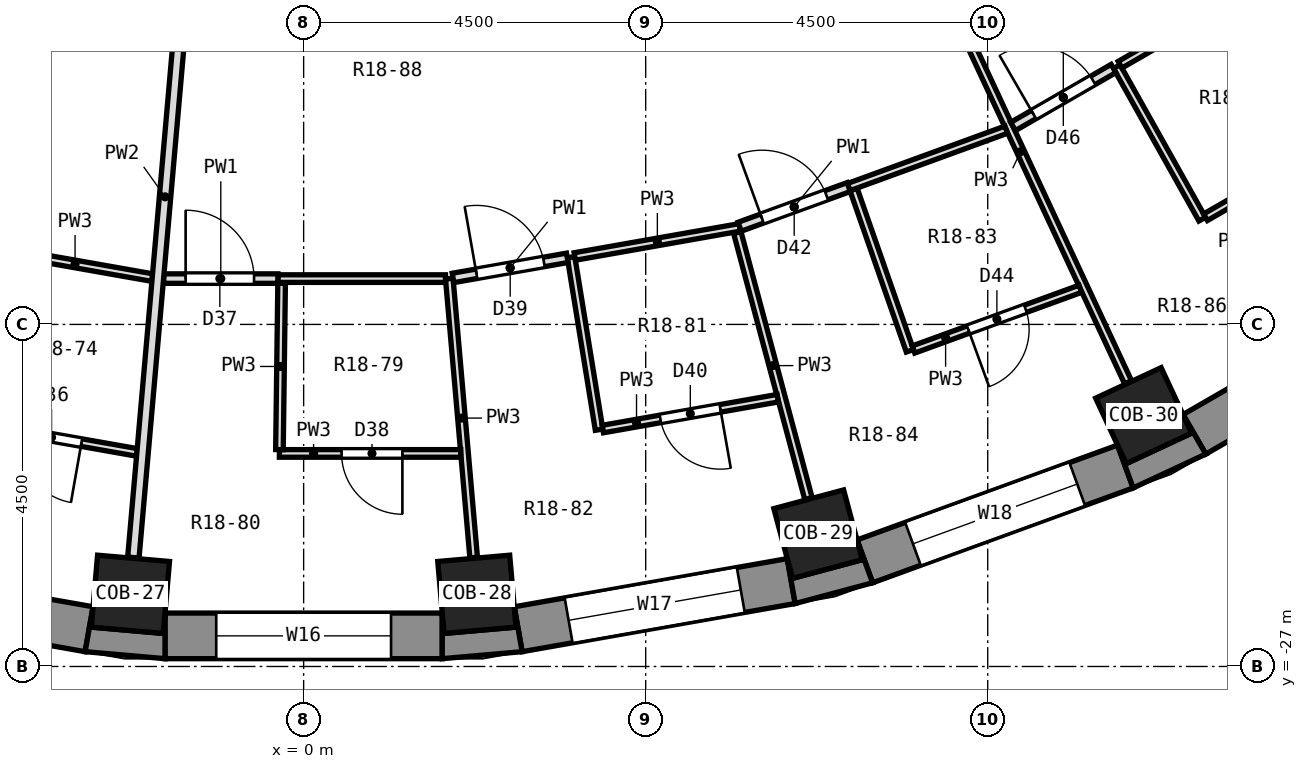
"""IFC4 building model, lengths in metres.
Left out: names, types, materials, properties, quantities, classifications, styles, units other than length and angle.
Written with IfcOpenShell. Run it as: python <this file> out.ifc"""

import sys

from ifc_helpers import new_model, si_unit, direction, frame, frame_2d, origin, origin_2d, place, context, subcontext, project, spatial, polyline, rectangle, outline, extrude, element, fill, save


model = new_model("IFC4")
c1 = context("Model", 3, precision=1e-05, world=origin(), true_north=direction((0.0, 1.0)))
c2 = subcontext(c1, "Body", "Model", "MODEL_VIEW")
j1 = project(units=[si_unit("LENGTHUNIT", "METRE"), si_unit("PLANEANGLEUNIT", "RADIAN")], contexts=[c1])
p1 = place(None, origin())
s1 = spatial("IfcSite", under=j1, at=p1, CompositionType="ELEMENT")
p2 = place(p1, origin())
s2 = spatial("IfcBuilding", under=s1, at=p2, CompositionType="ELEMENT")
p3 = place(p2, frame((0.0, 0.0, 101.8)))
s3 = spatial("IfcBuildingStorey", under=s2, at=p3, CompositionType="ELEMENT", Elevation=101.8)
for number, where, z_axis, x_axis in (
    (1, (-2.279, -26.051, 0.0), (0.0, 0.0, 1.0), (-0.087, -0.996, 0.0)),
    (2, (2.279, -26.051, 0.0), (0.0, 0.0, 1.0), (0.087, -0.996, 0.0)),
    (3, (6.768, -25.259, 0.0), (0.0, 0.0, 1.0), (0.259, -0.966, 0.0)),
    (4, (11.052, -23.7, 0.0), (0.0, 0.0, 1.0), (0.423, -0.906, 0.0)),
):
    element("IfcColumn", number, at=place(p3, frame(where, z_axis=z_axis, x_axis=x_axis)), inside=s3, PredefinedType="COLUMN", context=c2, shape_type="SweptSolid", body=[
        extrude(rectangle(XDim=0.95, YDim=0.95, at=origin_2d()), origin(), (0.0, 0.0, 1.0), 3.3),
    ])
p4 = place(p3, frame((-6.415, -25.876, 0.0), z_axis=(0.0, 0.0, 1.0), x_axis=(0.984803764455, -0.173670796382, 0.0)))
e5 = element("IfcWall", 5, at=p4, inside=s3, PredefinedType="SOLIDWALL", context=c2, shape_type="SweptSolid", body=[
    extrude(rectangle(XDim=3.648, YDim=0.6, at=frame_2d((1.824, 0.0))), origin(), (0.0, 0.0, 1.0), 2.8),
])
p5 = place(p4, frame((0.674, 0.0, 0.9)))
e6 = element("IfcOpeningElement", 6, at=p5, cuts=e5, PredefinedType="OPENING", context=c2, shape_type="SweptSolid", body=[
    extrude(rectangle(XDim=2.3, YDim=1.8, at=frame_2d((1.15, 0.9))), frame((0.0, 0.312, 0.0), z_axis=(0.0, -1.0, 0.0), x_axis=(1.0, 0.0, 0.0)), (0.0, 0.0, 1.0), 0.624),
])
p6 = place(p3, frame((-1.824, -26.597, 0.0), z_axis=(0.0, 0.0, 1.0), x_axis=(1.0, 0.0, 0.0)))
e7 = element("IfcWall", 7, at=p6, inside=s3, PredefinedType="SOLIDWALL", context=c2, shape_type="SweptSolid", body=[
    extrude(rectangle(XDim=3.648, YDim=0.6, at=frame_2d((1.824, 0.0))), origin(), (0.0, 0.0, 1.0), 2.8),
])
p7 = place(p6, frame((0.674, 0.0, 0.9)))
e8 = element("IfcOpeningElement", 8, at=p7, cuts=e7, PredefinedType="OPENING", context=c2, shape_type="SweptSolid", body=[
    extrude(rectangle(XDim=2.3, YDim=1.8, at=frame_2d((1.15, 0.9))), frame((0.0, 0.312, 0.0), z_axis=(0.0, -1.0, 0.0), x_axis=(1.0, 0.0, 0.0)), (0.0, 0.0, 1.0), 0.624),
])
p8 = place(p3, frame((2.822, -26.51, 0.0), z_axis=(0.0, 0.0, 1.0), x_axis=(0.984803764455, 0.173670796382, 0.0)))
e9 = element("IfcWall", 9, at=p8, inside=s3, PredefinedType="SOLIDWALL", context=c2, shape_type="SweptSolid", body=[
    extrude(rectangle(XDim=3.648, YDim=0.6, at=frame_2d((1.824, 0.0))), origin(), (0.0, 0.0, 1.0), 2.8),
])
p9 = place(p8, frame((0.674, 0.0, 0.9)))
e10 = element("IfcOpeningElement", 10, at=p9, cuts=e9, PredefinedType="OPENING", context=c2, shape_type="SweptSolid", body=[
    extrude(rectangle(XDim=2.3, YDim=1.8, at=frame_2d((1.15, 0.9))), frame((0.0, 0.312, 0.0), z_axis=(0.0, -1.0, 0.0), x_axis=(1.0, 0.0, 0.0)), (0.0, 0.0, 1.0), 0.624),
])
p10 = place(p3, frame((7.383, -25.617, 0.0), z_axis=(0.0, 0.0, 1.0), x_axis=(0.939703505393, 0.341990236633, 0.0)))
e11 = element("IfcWall", 11, at=p10, inside=s3, PredefinedType="SOLIDWALL", context=c2, shape_type="SweptSolid", body=[
    extrude(rectangle(XDim=3.648, YDim=0.6, at=frame_2d((1.824, 0.0))), origin(), (0.0, 0.0, 1.0), 2.8),
])
p11 = place(p10, frame((0.674, 0.0, 0.9)))
e12 = element("IfcOpeningElement", 12, at=p11, cuts=e11, PredefinedType="OPENING", context=c2, shape_type="SweptSolid", body=[
    extrude(rectangle(XDim=2.3, YDim=1.8, at=frame_2d((1.15, 0.9))), frame((0.0, 0.312, 0.0), z_axis=(0.0, -1.0, 0.0), x_axis=(1.0, 0.0, 0.0)), (0.0, 0.0, 1.0), 0.624),
])
p12 = place(p3, frame((11.719, -23.946, 0.0), z_axis=(0.0, 0.0, 1.0), x_axis=(0.866051847062, 0.499954196102, 0.0)))
e13 = element("IfcWall", 13, at=p12, inside=s3, PredefinedType="SOLIDWALL", context=c2, shape_type="SweptSolid", body=[
    extrude(rectangle(XDim=3.648, YDim=0.6, at=frame_2d((1.824, 0.0))), origin(), (0.0, 0.0, 1.0), 2.8),
])
p13 = place(p12, frame((0.674, 0.0, 0.9)))
e14 = element("IfcOpeningElement", 14, at=p13, cuts=e13, PredefinedType="OPENING", context=c2, shape_type="SweptSolid", body=[
    extrude(rectangle(XDim=2.3, YDim=1.8, at=frame_2d((1.15, 0.9))), frame((0.0, 0.312, 0.0), z_axis=(0.0, -1.0, 0.0), x_axis=(1.0, 0.0, 0.0)), (0.0, 0.0, 1.0), 0.624),
])
p14 = place(p3, origin())
e15 = element("IfcWall", 15, at=p14, inside=s3, PredefinedType="SOLIDWALL", context=c2, shape_type="SweptSolid", body=[
    extrude(outline(polyline([(-2.875, -26.805), (-1.824, -26.897), (-1.824, -26.297), (-1.847, -26.565), (-2.794, -26.482), (-2.77, -26.215), (-2.875, -26.805)])), origin(), (0.0, 0.0, 1.0), 2.8),
])
p15 = place(p3, origin())
e16 = element("IfcWall", 16, at=p15, inside=s3, PredefinedType="SOLIDWALL", context=c2, shape_type="SweptSolid", body=[
    extrude(outline(polyline([(2.875, -26.805), (2.77, -26.215), (2.794, -26.482), (1.847, -26.565), (1.824, -26.297), (1.824, -26.897), (2.875, -26.805)])), origin(), (0.0, 0.0, 1.0), 2.8),
])
p16 = place(p3, origin())
e17 = element("IfcWall", 17, at=p16, inside=s3, PredefinedType="SOLIDWALL", context=c2, shape_type="SweptSolid", body=[
    extrude(outline(polyline([(6.467, -26.172), (7.486, -25.899), (7.28, -25.335), (7.35, -25.595), (6.432, -25.841), (6.363, -25.581), (6.467, -26.172)])), origin(), (0.0, 0.0, 1.0), 2.8),
])
p17 = place(p3, origin())
e18 = element("IfcWall", 18, at=p17, inside=s3, PredefinedType="SOLIDWALL", context=c2, shape_type="SweptSolid", body=[
    extrude(outline(polyline([(10.913, -24.651), (11.869, -24.206), (11.569, -23.686), (11.683, -23.93), (10.822, -24.331), (10.708, -24.087), (10.913, -24.651)])), origin(), (0.0, 0.0, 1.0), 2.8),
])
p18 = place(p3, frame((1.916, -21.897, 0.0), z_axis=(0.0, 0.0, 1.0), x_axis=(0.087069954148, -0.996202199899, 0.0)))
e19 = element("IfcWall", 19, at=p18, inside=s3, PredefinedType="PARTITIONING", context=c2, shape_type="SweptSolid", body=[
    extrude(rectangle(XDim=3.684, YDim=0.1, at=frame_2d((1.842, 0.0))), origin(), (0.0, 0.0, 1.0), 2.8),
])
p19 = place(p3, frame((3.518, -21.615, 0.0), z_axis=(0.0, 0.0, 1.0), x_axis=(0.160403826344, -0.987051474085, 0.0)))
e20 = element("IfcWall", 20, at=p19, inside=s3, PredefinedType="PARTITIONING", context=c2, shape_type="SweptSolid", body=[
    extrude(rectangle(XDim=2.3, YDim=0.1, at=frame_2d((1.15, 0.0))), origin(), (0.0, 0.0, 1.0), 2.8),
])
p20 = place(p3, frame((5.706, -21.292, 0.0), z_axis=(0.0, 0.0, 1.0), x_axis=(0.258396854417, -0.966038853063, 0.0)))
e21 = element("IfcWall", 21, at=p20, inside=s3, PredefinedType="PARTITIONING", context=c2, shape_type="SweptSolid", body=[
    extrude(rectangle(XDim=3.622, YDim=0.1, at=frame_2d((1.811, 0.0))), origin(), (0.0, 0.0, 1.0), 2.8),
])
p21 = place(p3, frame((7.234, -20.723, 0.0), z_axis=(0.0, 0.0, 1.0), x_axis=(0.329707399535, -0.944083169372, 0.0)))
e22 = element("IfcWall", 22, at=p21, inside=s3, PredefinedType="PARTITIONING", context=c2, shape_type="SweptSolid", body=[
    extrude(rectangle(XDim=2.25, YDim=0.1, at=frame_2d((1.125, 0.0))), origin(), (0.0, 0.0, 1.0), 2.8),
])
p22 = place(p3, frame((8.018, -17.194, 0.0), z_axis=(0.0, 0.0, 1.0), x_axis=(0.422490057257, -0.906367558731, 0.0)))
e23 = element("IfcWall", 23, at=p22, inside=s3, PredefinedType="PARTITIONING", context=c2, shape_type="SweptSolid", body=[
    extrude(rectangle(XDim=6.693, YDim=0.1, at=frame_2d((3.347, 0.0))), origin(), (0.0, 0.0, 1.0), 2.8),
])
p23 = place(p3, frame((10.698, -19.108, 0.0), z_axis=(0.0, 0.0, 1.0), x_axis=(0.488622759198, -0.872495157117, 0.0)))
e24 = element("IfcWall", 24, at=p23, inside=s3, PredefinedType="PARTITIONING", context=c2, shape_type="SweptSolid", body=[
    extrude(rectangle(XDim=2.3, YDim=0.1, at=frame_2d((1.15, 0.0))), origin(), (0.0, 0.0, 1.0), 2.8),
])
p24 = place(p3, frame((-4.516, -23.774, 0.0), z_axis=(0.0, 0.0, 1.0), x_axis=(0.984810614942, -0.173631946077, 0.0)))
e25 = element("IfcWall", 25, at=p24, inside=s3, PredefinedType="PARTITIONING", context=c2, shape_type="SweptSolid", body=[
    extrude(rectangle(XDim=2.361, YDim=0.1, at=frame_2d((1.18, 0.0))), origin(), (0.0, 0.0, 1.0), 2.8),
])
p25 = place(p24, frame((0.818, 0.0, 0.0)))
e26 = element("IfcOpeningElement", 26, at=p25, cuts=e25, PredefinedType="OPENING", context=c2, shape_type="SweptSolid", body=[
    extrude(rectangle(XDim=0.8, YDim=2.1, at=frame_2d((0.4, 1.05))), frame((0.0, 0.062, 0.0), z_axis=(0.0, -1.0, 0.0), x_axis=(1.0, 0.0, 0.0)), (0.0, 0.0, 1.0), 0.124),
])
p26 = place(p3, frame((-4.025, -21.525, 0.0), z_axis=(0.0, 0.0, 1.0), x_axis=(0.984791880798, -0.173738169424, 0.0)))
e27 = element("IfcWall", 27, at=p26, inside=s3, PredefinedType="PARTITIONING", context=c2, shape_type="SweptSolid", body=[
    extrude(rectangle(XDim=2.067, YDim=0.1, at=frame_2d((1.034, 0.0))), origin(), (0.0, 0.0, 1.0), 2.8),
])
p27 = place(p3, frame((-0.319, -24.197, 0.0), z_axis=(0.0, 0.0, 1.0), x_axis=(1.0, 0.0, 0.0)))
e28 = element("IfcWall", 28, at=p27, inside=s3, PredefinedType="PARTITIONING", context=c2, shape_type="SweptSolid", body=[
    extrude(rectangle(XDim=2.386, YDim=0.1, at=frame_2d((1.193, 0.0))), origin(), (0.0, 0.0, 1.0), 2.8),
])
p28 = place(p27, frame((0.818, 0.0, 0.0)))
e29 = element("IfcOpeningElement", 29, at=p28, cuts=e28, PredefinedType="OPENING", context=c2, shape_type="SweptSolid", body=[
    extrude(rectangle(XDim=0.8, YDim=2.1, at=frame_2d((0.4, 1.05))), frame((0.0, 0.062, 0.0), z_axis=(0.0, -1.0, 0.0), x_axis=(1.0, 0.0, 0.0)), (0.0, 0.0, 1.0), 0.124),
])
p29 = place(p3, frame((-0.339, -21.897, 0.0), z_axis=(0.0, 0.0, 1.0), x_axis=(1.0, 0.0, 0.0)))
e30 = element("IfcWall", 30, at=p29, inside=s3, PredefinedType="PARTITIONING", context=c2, shape_type="SweptSolid", body=[
    extrude(rectangle(XDim=2.205, YDim=0.1, at=frame_2d((1.103, 0.0))), origin(), (0.0, 0.0, 1.0), 2.8),
])
p30 = place(p3, frame((-1.841, -21.897, 0.0), z_axis=(0.0, 0.0, 1.0), x_axis=(1.0, 0.0, 0.0)))
e31 = element("IfcWall", 31, at=p30, inside=s3, PredefinedType="PARTITIONING", context=c2, shape_type="SweptSolid", body=[
    extrude(rectangle(XDim=1.502, YDim=0.125, at=frame_2d((0.751, 0.0))), origin(), (0.0, 0.0, 1.0), 2.8),
])
p31 = place(p30, frame((0.289, 0.0, 0.0)))
e32 = element("IfcOpeningElement", 32, at=p31, cuts=e31, PredefinedType="OPENING", context=c2, shape_type="SweptSolid", body=[
    extrude(rectangle(XDim=0.9, YDim=2.1, at=frame_2d((0.45, 1.05))), frame((0.0, 0.074, 0.0), z_axis=(0.0, -1.0, 0.0), x_axis=(1.0, 0.0, 0.0)), (0.0, 0.0, 1.0), 0.149),
])
p32 = place(p3, frame((3.936, -23.876, 0.0), z_axis=(0.0, 0.0, 1.0), x_axis=(0.98482979879, 0.173523103404, 0.0)))
e33 = element("IfcWall", 33, at=p32, inside=s3, PredefinedType="PARTITIONING", context=c2, shape_type="SweptSolid", body=[
    extrude(rectangle(XDim=2.337, YDim=0.1, at=frame_2d((1.168, 0.0))), origin(), (0.0, 0.0, 1.0), 2.8),
])
p33 = place(p32, frame((0.769, 0.0, 0.0)))
e34 = element("IfcOpeningElement", 34, at=p33, cuts=e33, PredefinedType="OPENING", context=c2, shape_type="SweptSolid", body=[
    extrude(rectangle(XDim=0.8, YDim=2.1, at=frame_2d((0.4, 1.05))), frame((0.0, 0.062, 0.0), z_axis=(0.0, -1.0, 0.0), x_axis=(1.0, 0.0, 0.0)), (0.0, 0.0, 1.0), 0.124),
])
p34 = place(p3, frame((3.567, -21.606, 0.0), z_axis=(0.0, 0.0, 1.0), x_axis=(0.984800270927, 0.173690605338, 0.0)))
e35 = element("IfcWall", 35, at=p34, inside=s3, PredefinedType="PARTITIONING", context=c2, shape_type="SweptSolid", body=[
    extrude(rectangle(XDim=2.205, YDim=0.1, at=frame_2d((1.103, 0.0))), origin(), (0.0, 0.0, 1.0), 2.8),
])
p35 = place(p3, frame((1.965, -21.888, 0.0), z_axis=(0.0, 0.0, 1.0), x_axis=(0.984857531579, 0.173365632386, 0.0)))
e36 = element("IfcWall", 36, at=p35, inside=s3, PredefinedType="PARTITIONING", context=c2, shape_type="SweptSolid", body=[
    extrude(rectangle(XDim=1.527, YDim=0.125, at=frame_2d((0.763, 0.0))), origin(), (0.0, 0.0, 1.0), 2.8),
])
p36 = place(p35, frame((0.314, 0.0, 0.0)))
e37 = element("IfcOpeningElement", 37, at=p36, cuts=e36, PredefinedType="OPENING", context=c2, shape_type="SweptSolid", body=[
    extrude(rectangle(XDim=0.9, YDim=2.1, at=frame_2d((0.45, 1.05))), frame((0.0, 0.074, 0.0), z_axis=(0.0, -1.0, 0.0), x_axis=(1.0, 0.0, 0.0)), (0.0, 0.0, 1.0), 0.149),
])
p37 = place(p3, frame((8.023, -22.83, 0.0), z_axis=(0.0, 0.0, 1.0), x_axis=(0.939707949959, 0.341978023831, 0.0)))
e38 = element("IfcWall", 38, at=p37, inside=s3, PredefinedType="PARTITIONING", context=c2, shape_type="SweptSolid", body=[
    extrude(rectangle(XDim=2.336, YDim=0.1, at=frame_2d((1.168, 0.0))), origin(), (0.0, 0.0, 1.0), 2.8),
])
p38 = place(p37, frame((0.768, 0.0, 0.0)))
e39 = element("IfcOpeningElement", 39, at=p38, cuts=e38, PredefinedType="OPENING", context=c2, shape_type="SweptSolid", body=[
    extrude(rectangle(XDim=0.8, YDim=2.1, at=frame_2d((0.4, 1.05))), frame((0.0, 0.062, 0.0), z_axis=(0.0, -1.0, 0.0), x_axis=(1.0, 0.0, 0.0)), (0.0, 0.0, 1.0), 0.124),
])
p39 = place(p3, frame((7.171, -20.693, 0.0), z_axis=(0.0, 0.0, 1.0), x_axis=(0.939573404597, 0.342347509665, 0.0)))
e40 = element("IfcWall", 40, at=p39, inside=s3, PredefinedType="PARTITIONING", context=c2, shape_type="SweptSolid", body=[
    extrude(rectangle(XDim=2.205, YDim=0.1, at=frame_2d((1.103, 0.0))), origin(), (0.0, 0.0, 1.0), 2.8),
])
p40 = place(p3, frame((5.736, -21.215, 0.0), z_axis=(0.0, 0.0, 1.0), x_axis=(0.939798092341, 0.34173022347, 0.0)))
e41 = element("IfcWall", 41, at=p40, inside=s3, PredefinedType="PARTITIONING", context=c2, shape_type="SweptSolid", body=[
    extrude(rectangle(XDim=1.527, YDim=0.125, at=frame_2d((0.763, 0.0))), origin(), (0.0, 0.0, 1.0), 2.8),
])
p41 = place(p40, frame((0.314, 0.0, 0.0)))
e42 = element("IfcOpeningElement", 42, at=p41, cuts=e41, PredefinedType="OPENING", context=c2, shape_type="SweptSolid", body=[
    extrude(rectangle(XDim=0.9, YDim=2.1, at=frame_2d((0.45, 1.05))), frame((0.0, 0.074, 0.0), z_axis=(0.0, -1.0, 0.0), x_axis=(1.0, 0.0, 0.0)), (0.0, 0.0, 1.0), 0.149),
])
p42 = place(p3, frame((11.865, -21.09, 0.0), z_axis=(0.0, 0.0, 1.0), x_axis=(0.866046247233, 0.49996389635, 0.0)))
e43 = element("IfcWall", 43, at=p42, inside=s3, PredefinedType="PARTITIONING", context=c2, shape_type="SweptSolid", body=[
    extrude(rectangle(XDim=2.334, YDim=0.1, at=frame_2d((1.167, 0.0))), origin(), (0.0, 0.0, 1.0), 2.8),
])
p43 = place(p42, frame((0.768, 0.0, 0.0)))
e44 = element("IfcOpeningElement", 44, at=p43, cuts=e43, PredefinedType="OPENING", context=c2, shape_type="SweptSolid", body=[
    extrude(rectangle(XDim=0.8, YDim=2.1, at=frame_2d((0.4, 1.05))), frame((0.0, 0.062, 0.0), z_axis=(0.0, -1.0, 0.0), x_axis=(1.0, 0.0, 0.0)), (0.0, 0.0, 1.0), 0.124),
])
p44 = place(p3, frame((10.741, -19.083, 0.0), z_axis=(0.0, 0.0, 1.0), x_axis=(0.86618365172, 0.499725806311, 0.0)))
e45 = element("IfcWall", 45, at=p44, inside=s3, PredefinedType="PARTITIONING", context=c2, shape_type="SweptSolid", body=[
    extrude(rectangle(XDim=2.101, YDim=0.1, at=frame_2d((1.051, 0.0))), origin(), (0.0, 0.0, 1.0), 2.8),
])
p45 = place(p3, frame((9.333, -19.896, 0.0), z_axis=(0.0, 0.0, 1.0), x_axis=(0.86603905187, 0.499976360077, 0.0)))
e46 = element("IfcWall", 46, at=p45, inside=s3, PredefinedType="PARTITIONING", context=c2, shape_type="SweptSolid", body=[
    extrude(rectangle(XDim=1.526, YDim=0.125, at=frame_2d((0.763, 0.0))), origin(), (0.0, 0.0, 1.0), 2.8),
])
p46 = place(p45, frame((0.313, 0.0, 0.0)))
e47 = element("IfcOpeningElement", 47, at=p46, cuts=e46, PredefinedType="OPENING", context=c2, shape_type="SweptSolid", body=[
    extrude(rectangle(XDim=0.9, YDim=2.1, at=frame_2d((0.45, 1.05))), frame((0.0, 0.074, 0.0), z_axis=(0.0, -1.0, 0.0), x_axis=(1.0, 0.0, 0.0)), (0.0, 0.0, 1.0), 0.149),
])
p47 = place(p3, frame((-2.24, -25.567, 0.0), z_axis=(0.0, 0.0, 1.0), x_axis=(0.087555048891, 0.996159682688, 0.0)))
e48 = element("IfcWall", 48, at=p47, inside=s3, PredefinedType="PARTITIONING", context=c2, shape_type="SweptSolid", body=[
    extrude(rectangle(XDim=9.528, YDim=0.15, at=frame_2d((4.764, 0.0))), origin(), (0.0, 0.0, 1.0), 2.8),
])
p48 = place(p3, frame((-0.318, -24.147, 0.0), z_axis=(0.0, 0.0, 1.0), x_axis=(0.013056922579, 0.999914754753, 0.0)))
e49 = element("IfcWall", 49, at=p48, inside=s3, PredefinedType="PARTITIONING", context=c2, shape_type="SweptSolid", body=[
    extrude(rectangle(XDim=2.188, YDim=0.1, at=frame_2d((1.094, 0.0))), origin(), (0.0, 0.0, 1.0), 2.8),
])
p49 = place(p7, origin())
e50 = element("IfcWindow", 50, at=p49, inside=s3, PartitioningType="SINGLE_PANEL", PredefinedType="WINDOW", context=c2, shape_type="SweptSolid", body=[
    extrude(rectangle(XDim=2.3, YDim=1.8, at=frame_2d((1.15, 0.9))), frame((0.0, 0.18, 0.0), z_axis=(0.0, -1.0, 0.0), x_axis=(1.0, 0.0, 0.0)), (0.0, 0.0, 1.0), 0.06),
])
fill(e8, e50)
p50 = place(p9, origin())
e51 = element("IfcWindow", 51, at=p50, inside=s3, PartitioningType="SINGLE_PANEL", PredefinedType="WINDOW", context=c2, shape_type="SweptSolid", body=[
    extrude(rectangle(XDim=2.3, YDim=1.8, at=frame_2d((1.15, 0.9))), frame((0.0, 0.18, 0.0), z_axis=(0.0, -1.0, 0.0), x_axis=(1.0, 0.0, 0.0)), (0.0, 0.0, 1.0), 0.06),
])
fill(e10, e51)
p51 = place(p11, origin())
e52 = element("IfcWindow", 52, at=p51, inside=s3, PartitioningType="SINGLE_PANEL", PredefinedType="WINDOW", context=c2, shape_type="SweptSolid", body=[
    extrude(rectangle(XDim=2.3, YDim=1.8, at=frame_2d((1.15, 0.9))), frame((0.0, 0.18, 0.0), z_axis=(0.0, -1.0, 0.0), x_axis=(1.0, 0.0, 0.0)), (0.0, 0.0, 1.0), 0.06),
])
fill(e12, e52)
p52 = place(p25, frame((0.8, 0.0, 0.0), z_axis=(0.0, 0.0, 1.0), x_axis=(-1.0, 0.0, 0.0)))
e53 = element("IfcDoor", 53, at=p52, inside=s3, OperationType="SINGLE_SWING_LEFT", PredefinedType="DOOR", context=c2, shape_type="SweptSolid", body=[
    extrude(rectangle(XDim=0.8, YDim=2.1, at=frame_2d((0.4, 1.05))), frame((0.0, 0.025, 0.0), z_axis=(0.0, -1.0, 0.0), x_axis=(1.0, 0.0, 0.0)), (0.0, 0.0, 1.0), 0.05),
])
fill(e26, e53)
p53 = place(p31, origin())
e54 = element("IfcDoor", 54, at=p53, inside=s3, OperationType="SINGLE_SWING_LEFT", PredefinedType="DOOR", context=c2, shape_type="SweptSolid", body=[
    extrude(rectangle(XDim=0.9, YDim=2.1, at=frame_2d((0.45, 1.05))), frame((0.0, 0.025, 0.0), z_axis=(0.0, -1.0, 0.0), x_axis=(1.0, 0.0, 0.0)), (0.0, 0.0, 1.0), 0.05),
])
fill(e32, e54)
p54 = place(p28, frame((0.8, 0.0, 0.0), z_axis=(0.0, 0.0, 1.0), x_axis=(-1.0, 0.0, 0.0)))
e55 = element("IfcDoor", 55, at=p54, inside=s3, OperationType="SINGLE_SWING_LEFT", PredefinedType="DOOR", context=c2, shape_type="SweptSolid", body=[
    extrude(rectangle(XDim=0.8, YDim=2.1, at=frame_2d((0.4, 1.05))), frame((0.0, 0.025, 0.0), z_axis=(0.0, -1.0, 0.0), x_axis=(1.0, 0.0, 0.0)), (0.0, 0.0, 1.0), 0.05),
])
fill(e29, e55)
p55 = place(p36, origin())
e56 = element("IfcDoor", 56, at=p55, inside=s3, OperationType="SINGLE_SWING_LEFT", PredefinedType="DOOR", context=c2, shape_type="SweptSolid", body=[
    extrude(rectangle(XDim=0.9, YDim=2.1, at=frame_2d((0.45, 1.05))), frame((0.0, 0.025, 0.0), z_axis=(0.0, -1.0, 0.0), x_axis=(1.0, 0.0, 0.0)), (0.0, 0.0, 1.0), 0.05),
])
fill(e37, e56)
p56 = place(p33, frame((0.8, 0.0, 0.0), z_axis=(0.0, 0.0, 1.0), x_axis=(-1.0, 0.0, 0.0)))
e57 = element("IfcDoor", 57, at=p56, inside=s3, OperationType="SINGLE_SWING_LEFT", PredefinedType="DOOR", context=c2, shape_type="SweptSolid", body=[
    extrude(rectangle(XDim=0.8, YDim=2.1, at=frame_2d((0.4, 1.05))), frame((0.0, 0.025, 0.0), z_axis=(0.0, -1.0, 0.0), x_axis=(1.0, 0.0, 0.0)), (0.0, 0.0, 1.0), 0.05),
])
fill(e34, e57)
p57 = place(p41, origin())
e58 = element("IfcDoor", 58, at=p57, inside=s3, OperationType="SINGLE_SWING_LEFT", PredefinedType="DOOR", context=c2, shape_type="SweptSolid", body=[
    extrude(rectangle(XDim=0.9, YDim=2.1, at=frame_2d((0.45, 1.05))), frame((0.0, 0.025, 0.0), z_axis=(0.0, -1.0, 0.0), x_axis=(1.0, 0.0, 0.0)), (0.0, 0.0, 1.0), 0.05),
])
fill(e42, e58)
p58 = place(p38, frame((0.8, 0.0, 0.0), z_axis=(0.0, 0.0, 1.0), x_axis=(-1.0, 0.0, 0.0)))
e59 = element("IfcDoor", 59, at=p58, inside=s3, OperationType="SINGLE_SWING_RIGHT", PredefinedType="DOOR", context=c2, shape_type="SweptSolid", body=[
    extrude(rectangle(XDim=0.8, YDim=2.1, at=frame_2d((0.4, 1.05))), frame((0.0, 0.025, 0.0), z_axis=(0.0, -1.0, 0.0), x_axis=(1.0, 0.0, 0.0)), (0.0, 0.0, 1.0), 0.05),
])
fill(e39, e59)
p59 = place(p46, origin())
e60 = element("IfcDoor", 60, at=p59, inside=s3, OperationType="SINGLE_SWING_LEFT", PredefinedType="DOOR", context=c2, shape_type="SweptSolid", body=[
    extrude(rectangle(XDim=0.9, YDim=2.1, at=frame_2d((0.45, 1.05))), frame((0.0, 0.025, 0.0), z_axis=(0.0, -1.0, 0.0), x_axis=(1.0, 0.0, 0.0)), (0.0, 0.0, 1.0), 0.05),
])
fill(e47, e60)
save(model, sys.argv[1])
